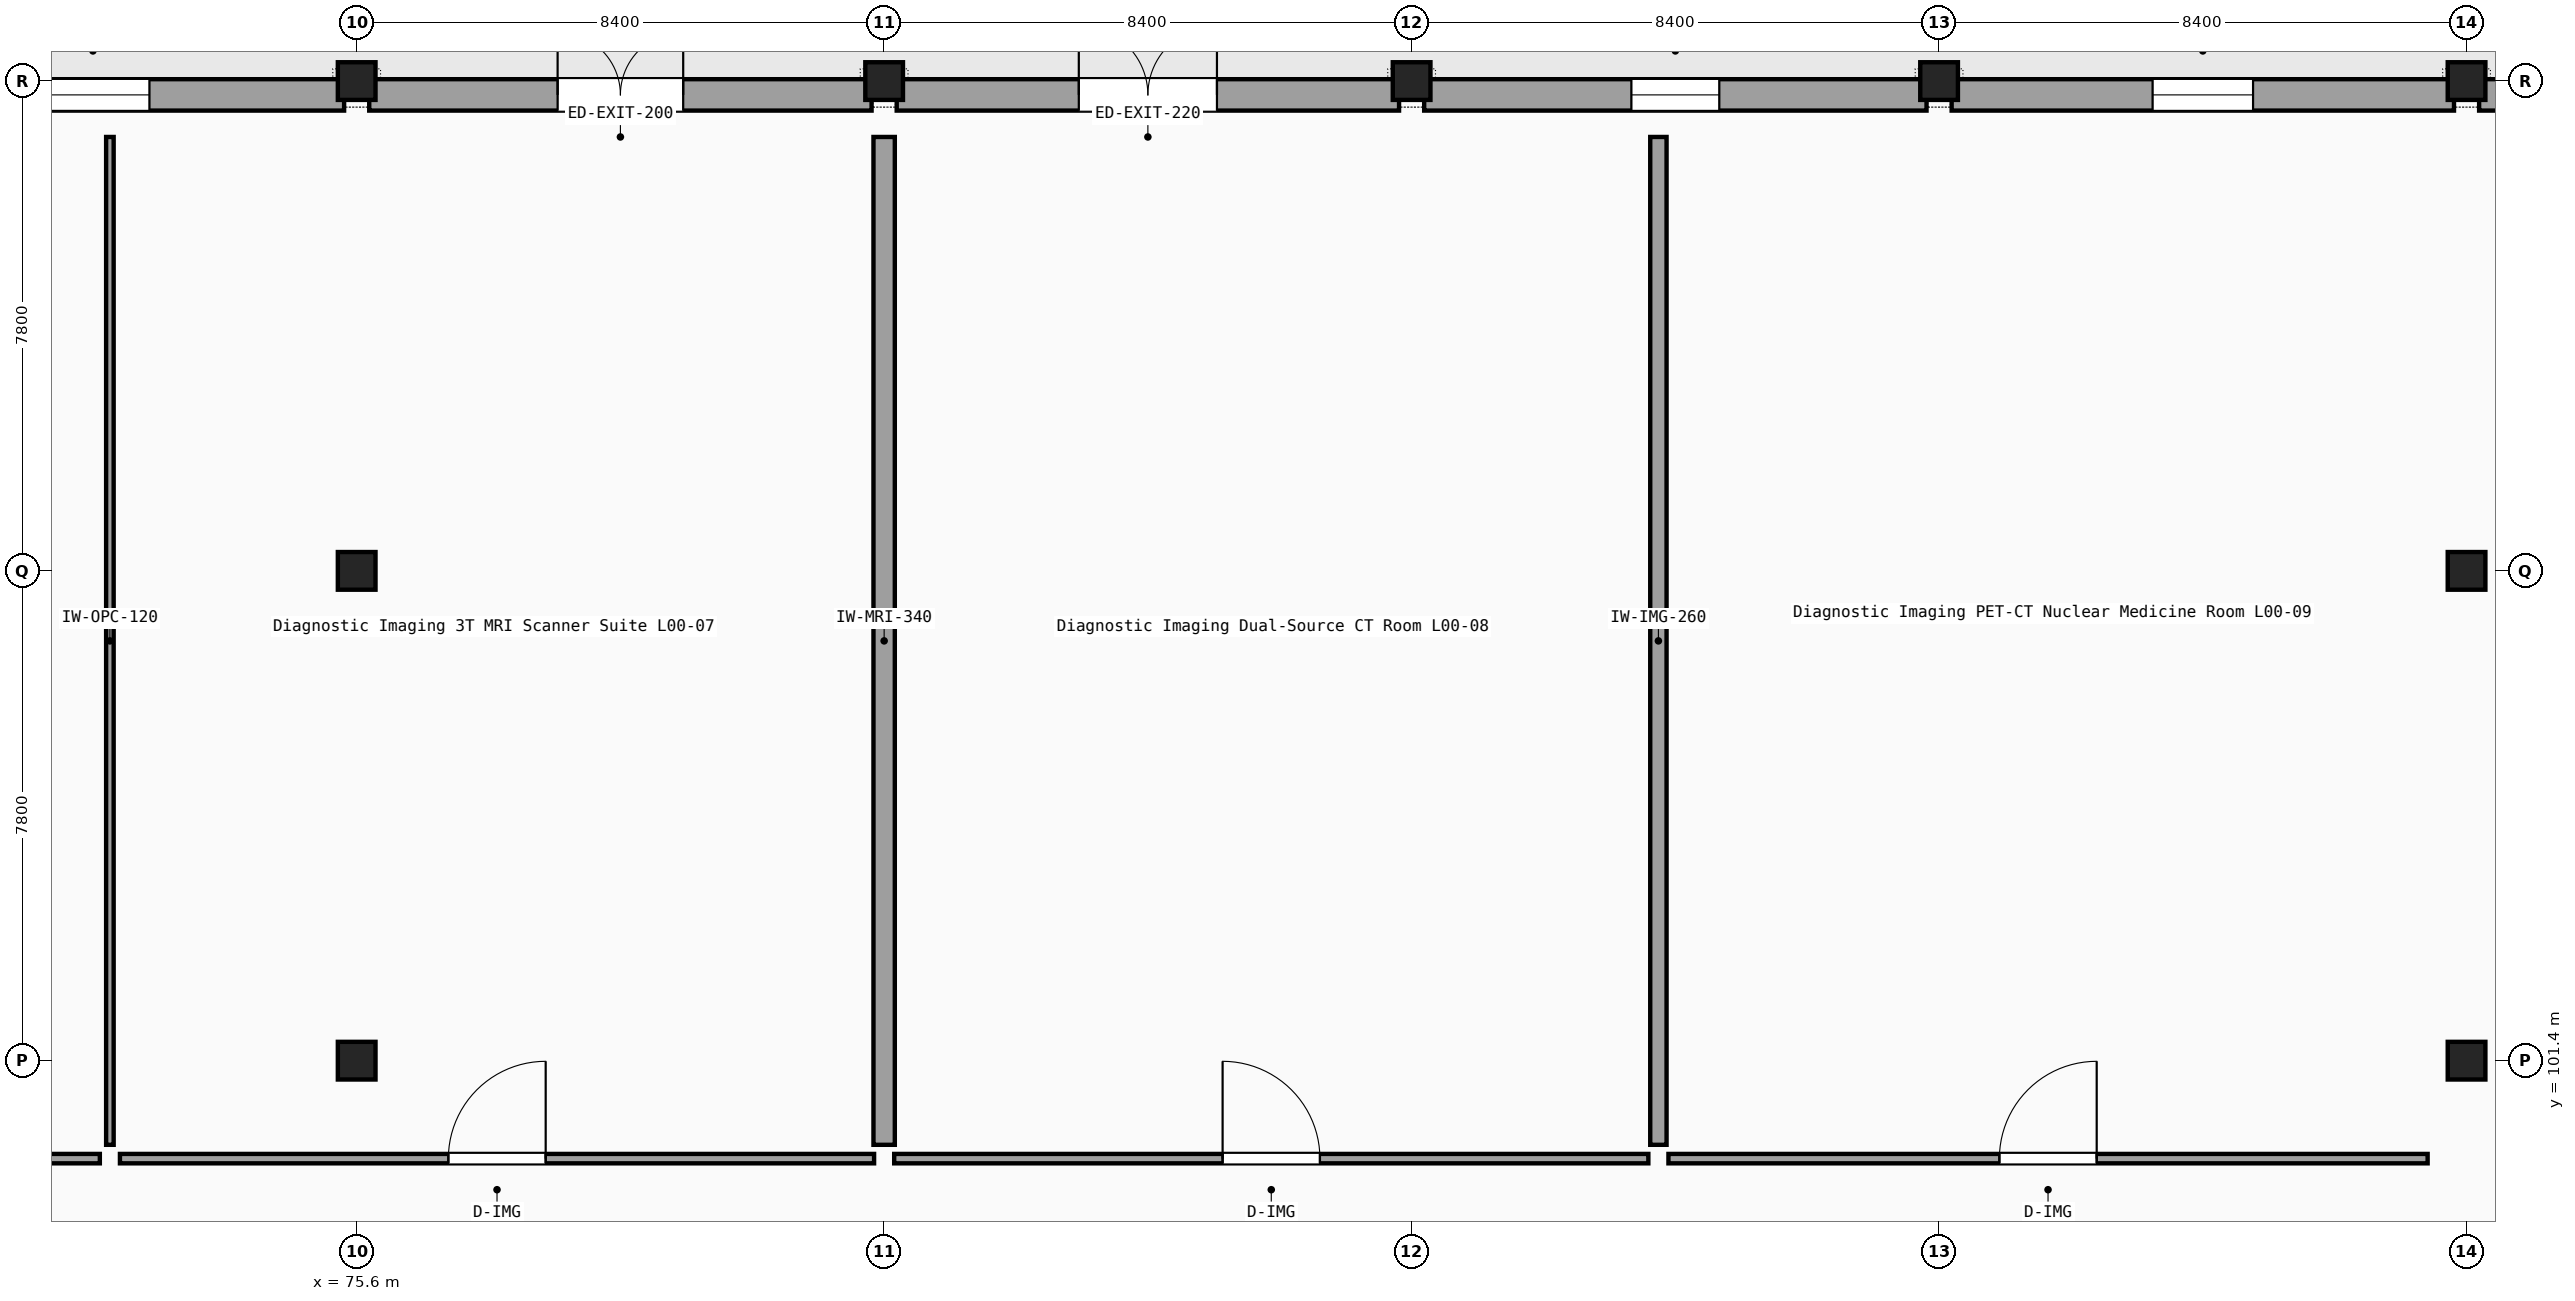
"""IFC4 building model, lengths in metres.
Left out: names, types, materials, properties, quantities, classifications, styles, units other than length and angle.
Written with IfcOpenShell. Run it as: python <this file> out.ifc"""

import sys

from ifc_helpers import new_model, si_unit, direction, frame, frame_2d, origin, origin_2d, place, context, subcontext, project, spatial, rectangle, i_section, extrude, element, fill, save


model = new_model("IFC4")
c1 = context("Model", 3, precision=1e-05, world=origin(), true_north=direction((0.0, 1.0)))
c2 = subcontext(c1, "Body", "Model", "MODEL_VIEW")
j1 = project(units=[si_unit("LENGTHUNIT", "METRE"), si_unit("PLANEANGLEUNIT", "RADIAN")], contexts=[c1])
p1 = place(None, origin())
s1 = spatial("IfcSite", under=j1, at=p1, CompositionType="ELEMENT")
p2 = place(p1, origin())
s2 = spatial("IfcBuilding", under=s1, at=p2, CompositionType="ELEMENT")
p3 = place(p2, origin())
s3 = spatial("IfcBuildingStorey", under=s2, at=p3, CompositionType="ELEMENT", Elevation=0.0)
for number, where, z_axis, x_axis in (
    (1, (75.6, 101.4, 0.0), (0.0, 0.0, 1.0), (1.0, 0.0, 0.0)),
    (2, (75.6, 109.2, 0.0), (0.0, 0.0, 1.0), (1.0, 0.0, 0.0)),
    (3, (75.6, 117.0, 0.0), (0.0, 0.0, 1.0), (1.0, 0.0, 0.0)),
    (4, (84.0, 117.0, 0.0), (0.0, 0.0, 1.0), (1.0, 0.0, 0.0)),
    (5, (92.4, 117.0, 0.0), (0.0, 0.0, 1.0), (1.0, 0.0, 0.0)),
    (6, (100.8, 117.0, 0.0), (0.0, 0.0, 1.0), (1.0, 0.0, 0.0)),
    (7, (109.2, 101.4, 0.0), (0.0, 0.0, 1.0), (1.0, 0.0, 0.0)),
    (8, (109.2, 109.2, 0.0), (0.0, 0.0, 1.0), (1.0, 0.0, 0.0)),
    (9, (109.2, 117.0, 0.0), (0.0, 0.0, 1.0), (1.0, 0.0, 0.0)),
):
    element("IfcColumn", number, at=place(p3, frame(where, z_axis=z_axis, x_axis=x_axis)), inside=s3, PredefinedType="COLUMN", context=c2, shape_type="SweptSolid", body=[
        extrude(i_section(OverallWidth=0.3, OverallDepth=0.6, WebThickness=0.015, FlangeThickness=0.03, FilletRadius=0.027, at=origin_2d()), origin(), (0.0, 0.0, 1.0), 5.1),
    ])
p4 = place(p3, frame((67.4, 116.78, 0.0), z_axis=(0.0, 0.0, 1.0), x_axis=(1.0, 0.0, 0.0)))
e10 = element("IfcWall", 10, at=p4, inside=s3, PredefinedType="SOLIDWALL", context=c2, shape_type="SweptSolid", body=[
    extrude(rectangle(XDim=8.0, YDim=0.5, at=frame_2d((4.0, 0.0))), origin(), (0.0, 0.0, 1.0), 4.4),
])
p5 = place(p4, frame((3.1, 0.0, 1.4)))
e11 = element("IfcOpeningElement", 11, at=p5, cuts=e10, PredefinedType="OPENING", context=c2, shape_type="SweptSolid", body=[
    extrude(rectangle(XDim=1.8, YDim=1.1, at=frame_2d((0.9, 0.55))), frame((0.0, 0.26, 0.0), z_axis=(0.0, -1.0, 0.0), x_axis=(1.0, 0.0, 0.0)), (0.0, 0.0, 1.0), 0.52),
])
p6 = place(p3, frame((75.8, 116.78, 0.0), z_axis=(0.0, 0.0, 1.0), x_axis=(1.0, 0.0, 0.0)))
e12 = element("IfcWall", 12, at=p6, inside=s3, PredefinedType="SOLIDWALL", context=c2, shape_type="SweptSolid", body=[
    extrude(rectangle(XDim=8.0, YDim=0.5, at=frame_2d((4.0, 0.0))), origin(), (0.0, 0.0, 1.0), 4.4),
])
p7 = place(p6, frame((3.0, 0.0, 0.0)))
e13 = element("IfcOpeningElement", 13, at=p7, cuts=e12, PredefinedType="OPENING", context=c2, shape_type="SweptSolid", body=[
    extrude(rectangle(XDim=2.0, YDim=2.25, at=frame_2d((1.0, 1.125))), frame((0.0, 0.26, 0.0), z_axis=(0.0, -1.0, 0.0), x_axis=(1.0, 0.0, 0.0)), (0.0, 0.0, 1.0), 0.52),
])
p8 = place(p3, frame((84.2, 116.78, 0.0), z_axis=(0.0, 0.0, 1.0), x_axis=(1.0, 0.0, 0.0)))
e14 = element("IfcWall", 14, at=p8, inside=s3, PredefinedType="SOLIDWALL", context=c2, shape_type="SweptSolid", body=[
    extrude(rectangle(XDim=8.0, YDim=0.5, at=frame_2d((4.0, 0.0))), origin(), (0.0, 0.0, 1.0), 4.41),
])
p9 = place(p8, frame((2.9, 0.0, 0.0)))
e15 = element("IfcOpeningElement", 15, at=p9, cuts=e14, PredefinedType="OPENING", context=c2, shape_type="SweptSolid", body=[
    extrude(rectangle(XDim=2.2, YDim=2.3, at=frame_2d((1.1, 1.15))), frame((0.0, 0.26, 0.0), z_axis=(0.0, -1.0, 0.0), x_axis=(1.0, 0.0, 0.0)), (0.0, 0.0, 1.0), 0.52),
])
p10 = place(p3, frame((92.6, 116.78, 0.0), z_axis=(0.0, 0.0, 1.0), x_axis=(1.0, 0.0, 0.0)))
e16 = element("IfcWall", 16, at=p10, inside=s3, PredefinedType="SOLIDWALL", context=c2, shape_type="SweptSolid", body=[
    extrude(rectangle(XDim=8.0, YDim=0.5, at=frame_2d((4.0, 0.0))), origin(), (0.0, 0.0, 1.0), 4.41),
])
p11 = place(p10, frame((3.3, 0.0, 0.95)))
e17 = element("IfcOpeningElement", 17, at=p11, cuts=e16, PredefinedType="OPENING", context=c2, shape_type="SweptSolid", body=[
    extrude(rectangle(XDim=1.4, YDim=1.55, at=frame_2d((0.7, 0.775))), frame((0.0, 0.26, 0.0), z_axis=(0.0, -1.0, 0.0), x_axis=(1.0, 0.0, 0.0)), (0.0, 0.0, 1.0), 0.52),
])
p12 = place(p3, frame((101.0, 116.78, 0.0), z_axis=(0.0, 0.0, 1.0), x_axis=(1.0, 0.0, 0.0)))
e18 = element("IfcWall", 18, at=p12, inside=s3, PredefinedType="SOLIDWALL", context=c2, shape_type="SweptSolid", body=[
    extrude(rectangle(XDim=8.0, YDim=0.5, at=frame_2d((4.0, 0.0))), origin(), (0.0, 0.0, 1.0), 4.4),
])
p13 = place(p12, frame((3.2, 0.0, 1.15)))
e19 = element("IfcOpeningElement", 19, at=p13, cuts=e18, PredefinedType="OPENING", context=c2, shape_type="SweptSolid", body=[
    extrude(rectangle(XDim=1.6, YDim=1.3, at=frame_2d((0.8, 0.65))), frame((0.0, 0.26, 0.0), z_axis=(0.0, -1.0, 0.0), x_axis=(1.0, 0.0, 0.0)), (0.0, 0.0, 1.0), 0.52),
])
p14 = place(p3, frame((109.4, 116.78, 0.0), z_axis=(0.0, 0.0, 1.0), x_axis=(1.0, 0.0, 0.0)))
e20 = element("IfcWall", 20, at=p14, inside=s3, PredefinedType="SOLIDWALL", context=c2, shape_type="SweptSolid", body=[
    extrude(rectangle(XDim=8.0, YDim=0.5, at=frame_2d((4.0, 0.0))), origin(), (0.0, 0.0, 1.0), 4.4),
])
p15 = place(p14, frame((2.65, 0.0, 1.0)))
e21 = element("IfcOpeningElement", 21, at=p15, cuts=e20, PredefinedType="OPENING", context=c2, shape_type="SweptSolid", body=[
    extrude(rectangle(XDim=2.7, YDim=1.45, at=frame_2d((1.35, 0.725))), frame((0.0, 0.26, 0.0), z_axis=(0.0, -1.0, 0.0), x_axis=(1.0, 0.0, 0.0)), (0.0, 0.0, 1.0), 0.52),
])
p16 = place(p3, frame((59.42, 99.84, 0.0), z_axis=(0.0, 0.0, 1.0), x_axis=(1.0, 0.0, 0.0)))
e22 = element("IfcWall", 22, at=p16, inside=s3, PredefinedType="PARTITIONING", context=c2, shape_type="SweptSolid", body=[
    extrude(rectangle(XDim=12.09, YDim=0.15, at=frame_2d((6.045, 0.0))), origin(), (0.0, 0.0, 1.0), 4.4),
])
p17 = place(p16, frame((5.52, 0.0, 0.0)))
e23 = element("IfcOpeningElement", 23, at=p17, cuts=e22, PredefinedType="OPENING", context=c2, shape_type="SweptSolid", body=[
    extrude(rectangle(XDim=1.05, YDim=2.15, at=frame_2d((0.525, 1.075))), frame((0.0, 0.085, 0.0), z_axis=(0.0, -1.0, 0.0), x_axis=(1.0, 0.0, 0.0)), (0.0, 0.0, 1.0), 0.17),
])
p18 = place(p3, frame((71.67, 100.06, 0.0), z_axis=(0.0, 0.0, 1.0), x_axis=(0.0, 1.0, 0.0)))
e24 = element("IfcWall", 24, at=p18, inside=s3, PredefinedType="PARTITIONING", context=c2, shape_type="SweptSolid", body=[
    extrude(rectangle(XDim=16.05, YDim=0.12, at=frame_2d((8.025, 0.0))), origin(), (0.0, 0.0, 1.0), 4.31),
])
p19 = place(p3, frame((71.83, 99.84, 0.0), z_axis=(0.0, 0.0, 1.0), x_axis=(1.0, 0.0, 0.0)))
e25 = element("IfcWall", 25, at=p19, inside=s3, PredefinedType="PARTITIONING", context=c2, shape_type="SweptSolid", body=[
    extrude(rectangle(XDim=12.01, YDim=0.15, at=frame_2d((6.005, 0.0))), origin(), (0.0, 0.0, 1.0), 4.4),
])
p20 = place(p19, frame((5.23, 0.0, 0.0)))
e26 = element("IfcOpeningElement", 26, at=p20, cuts=e25, PredefinedType="OPENING", context=c2, shape_type="SweptSolid", body=[
    extrude(rectangle(XDim=1.55, YDim=2.25, at=frame_2d((0.775, 1.125))), frame((0.0, 0.085, 0.0), z_axis=(0.0, -1.0, 0.0), x_axis=(1.0, 0.0, 0.0)), (0.0, 0.0, 1.0), 0.17),
])
p21 = place(p3, frame((84.0, 100.06, 0.0), z_axis=(0.0, 0.0, 1.0), x_axis=(0.0, 1.0, 0.0)))
e27 = element("IfcWall", 27, at=p21, inside=s3, PredefinedType="PARTITIONING", context=c2, shape_type="SweptSolid", body=[
    extrude(rectangle(XDim=16.05, YDim=0.34, at=frame_2d((8.025, 0.0))), origin(), (0.0, 0.0, 1.0), 4.8),
])
p22 = place(p3, frame((84.16, 99.84, 0.0), z_axis=(0.0, 0.0, 1.0), x_axis=(1.0, 0.0, 0.0)))
e28 = element("IfcWall", 28, at=p22, inside=s3, PredefinedType="PARTITIONING", context=c2, shape_type="SweptSolid", body=[
    extrude(rectangle(XDim=12.01, YDim=0.15, at=frame_2d((6.005, 0.0))), origin(), (0.0, 0.0, 1.0), 4.8),
])
p23 = place(p22, frame((5.23, 0.0, 0.0)))
e29 = element("IfcOpeningElement", 29, at=p23, cuts=e28, PredefinedType="OPENING", context=c2, shape_type="SweptSolid", body=[
    extrude(rectangle(XDim=1.55, YDim=2.25, at=frame_2d((0.775, 1.125))), frame((0.0, 0.085, 0.0), z_axis=(0.0, -1.0, 0.0), x_axis=(1.0, 0.0, 0.0)), (0.0, 0.0, 1.0), 0.17),
])
p24 = place(p3, frame((96.33, 100.06, 0.0), z_axis=(0.0, 0.0, 1.0), x_axis=(0.0, 1.0, 0.0)))
e30 = element("IfcWall", 30, at=p24, inside=s3, PredefinedType="PARTITIONING", context=c2, shape_type="SweptSolid", body=[
    extrude(rectangle(XDim=16.05, YDim=0.26, at=frame_2d((8.025, 0.0))), origin(), (0.0, 0.0, 1.0), 4.8),
])
p25 = place(p3, frame((96.49, 99.84, 0.0), z_axis=(0.0, 0.0, 1.0), x_axis=(1.0, 0.0, 0.0)))
e31 = element("IfcWall", 31, at=p25, inside=s3, PredefinedType="PARTITIONING", context=c2, shape_type="SweptSolid", body=[
    extrude(rectangle(XDim=12.09, YDim=0.15, at=frame_2d((6.045, 0.0))), origin(), (0.0, 0.0, 1.0), 4.8),
])
p26 = place(p25, frame((5.27, 0.0, 0.0)))
e32 = element("IfcOpeningElement", 32, at=p26, cuts=e31, PredefinedType="OPENING", context=c2, shape_type="SweptSolid", body=[
    extrude(rectangle(XDim=1.55, YDim=2.25, at=frame_2d((0.775, 1.125))), frame((0.0, 0.085, 0.0), z_axis=(0.0, -1.0, 0.0), x_axis=(1.0, 0.0, 0.0)), (0.0, 0.0, 1.0), 0.17),
])
p27 = place(p5, origin())
e33 = element("IfcWindow", 33, at=p27, inside=s3, PartitioningType="SINGLE_PANEL", PredefinedType="WINDOW", context=c2, shape_type="SweptSolid", body=[
    extrude(rectangle(XDim=1.8, YDim=1.1, at=frame_2d((0.9, 0.55))), frame((0.0, 0.03, 0.0), z_axis=(0.0, -1.0, 0.0), x_axis=(1.0, 0.0, 0.0)), (0.0, 0.0, 1.0), 0.06),
])
fill(e11, e33)
p28 = place(p7, origin())
e34 = element("IfcDoor", 34, at=p28, inside=s3, OperationType="DOUBLE_DOOR_SINGLE_SWING", PredefinedType="DOOR", context=c2, shape_type="SweptSolid", body=[
    extrude(rectangle(XDim=2.0, YDim=2.25, at=frame_2d((1.0, 1.125))), frame((0.0, 0.025, 0.0), z_axis=(0.0, -1.0, 0.0), x_axis=(1.0, 0.0, 0.0)), (0.0, 0.0, 1.0), 0.05),
])
fill(e13, e34)
p29 = place(p9, origin())
e35 = element("IfcDoor", 35, at=p29, inside=s3, OperationType="DOUBLE_DOOR_SINGLE_SWING", PredefinedType="DOOR", context=c2, shape_type="SweptSolid", body=[
    extrude(rectangle(XDim=2.2, YDim=2.3, at=frame_2d((1.1, 1.15))), frame((0.0, 0.025, 0.0), z_axis=(0.0, -1.0, 0.0), x_axis=(1.0, 0.0, 0.0)), (0.0, 0.0, 1.0), 0.05),
])
fill(e15, e35)
p30 = place(p11, origin())
e36 = element("IfcWindow", 36, at=p30, inside=s3, PartitioningType="SINGLE_PANEL", PredefinedType="WINDOW", context=c2, shape_type="SweptSolid", body=[
    extrude(rectangle(XDim=1.4, YDim=1.55, at=frame_2d((0.7, 0.775))), frame((0.0, 0.03, 0.0), z_axis=(0.0, -1.0, 0.0), x_axis=(1.0, 0.0, 0.0)), (0.0, 0.0, 1.0), 0.06),
])
fill(e17, e36)
p31 = place(p13, origin())
e37 = element("IfcWindow", 37, at=p31, inside=s3, PartitioningType="SINGLE_PANEL", PredefinedType="WINDOW", context=c2, shape_type="SweptSolid", body=[
    extrude(rectangle(XDim=1.6, YDim=1.3, at=frame_2d((0.8, 0.65))), frame((0.0, 0.03, 0.0), z_axis=(0.0, -1.0, 0.0), x_axis=(1.0, 0.0, 0.0)), (0.0, 0.0, 1.0), 0.06),
])
fill(e19, e37)
p32 = place(p20, origin())
e38 = element("IfcDoor", 38, at=p32, inside=s3, OperationType="SINGLE_SWING_RIGHT", PredefinedType="DOOR", context=c2, shape_type="SweptSolid", body=[
    extrude(rectangle(XDim=1.55, YDim=2.25, at=frame_2d((0.775, 1.125))), frame((0.0, 0.025, 0.0), z_axis=(0.0, -1.0, 0.0), x_axis=(1.0, 0.0, 0.0)), (0.0, 0.0, 1.0), 0.05),
])
fill(e26, e38)
p33 = place(p23, origin())
e39 = element("IfcDoor", 39, at=p33, inside=s3, OperationType="SINGLE_SWING_LEFT", PredefinedType="DOOR", context=c2, shape_type="SweptSolid", body=[
    extrude(rectangle(XDim=1.55, YDim=2.25, at=frame_2d((0.775, 1.125))), frame((0.0, 0.025, 0.0), z_axis=(0.0, -1.0, 0.0), x_axis=(1.0, 0.0, 0.0)), (0.0, 0.0, 1.0), 0.05),
])
fill(e29, e39)
p34 = place(p26, origin())
e40 = element("IfcDoor", 40, at=p34, inside=s3, OperationType="SINGLE_SWING_RIGHT", PredefinedType="DOOR", context=c2, shape_type="SweptSolid", body=[
    extrude(rectangle(XDim=1.55, YDim=2.25, at=frame_2d((0.775, 1.125))), frame((0.0, 0.025, 0.0), z_axis=(0.0, -1.0, 0.0), x_axis=(1.0, 0.0, 0.0)), (0.0, 0.0, 1.0), 0.05),
])
fill(e32, e40)
save(model, sys.argv[1])
